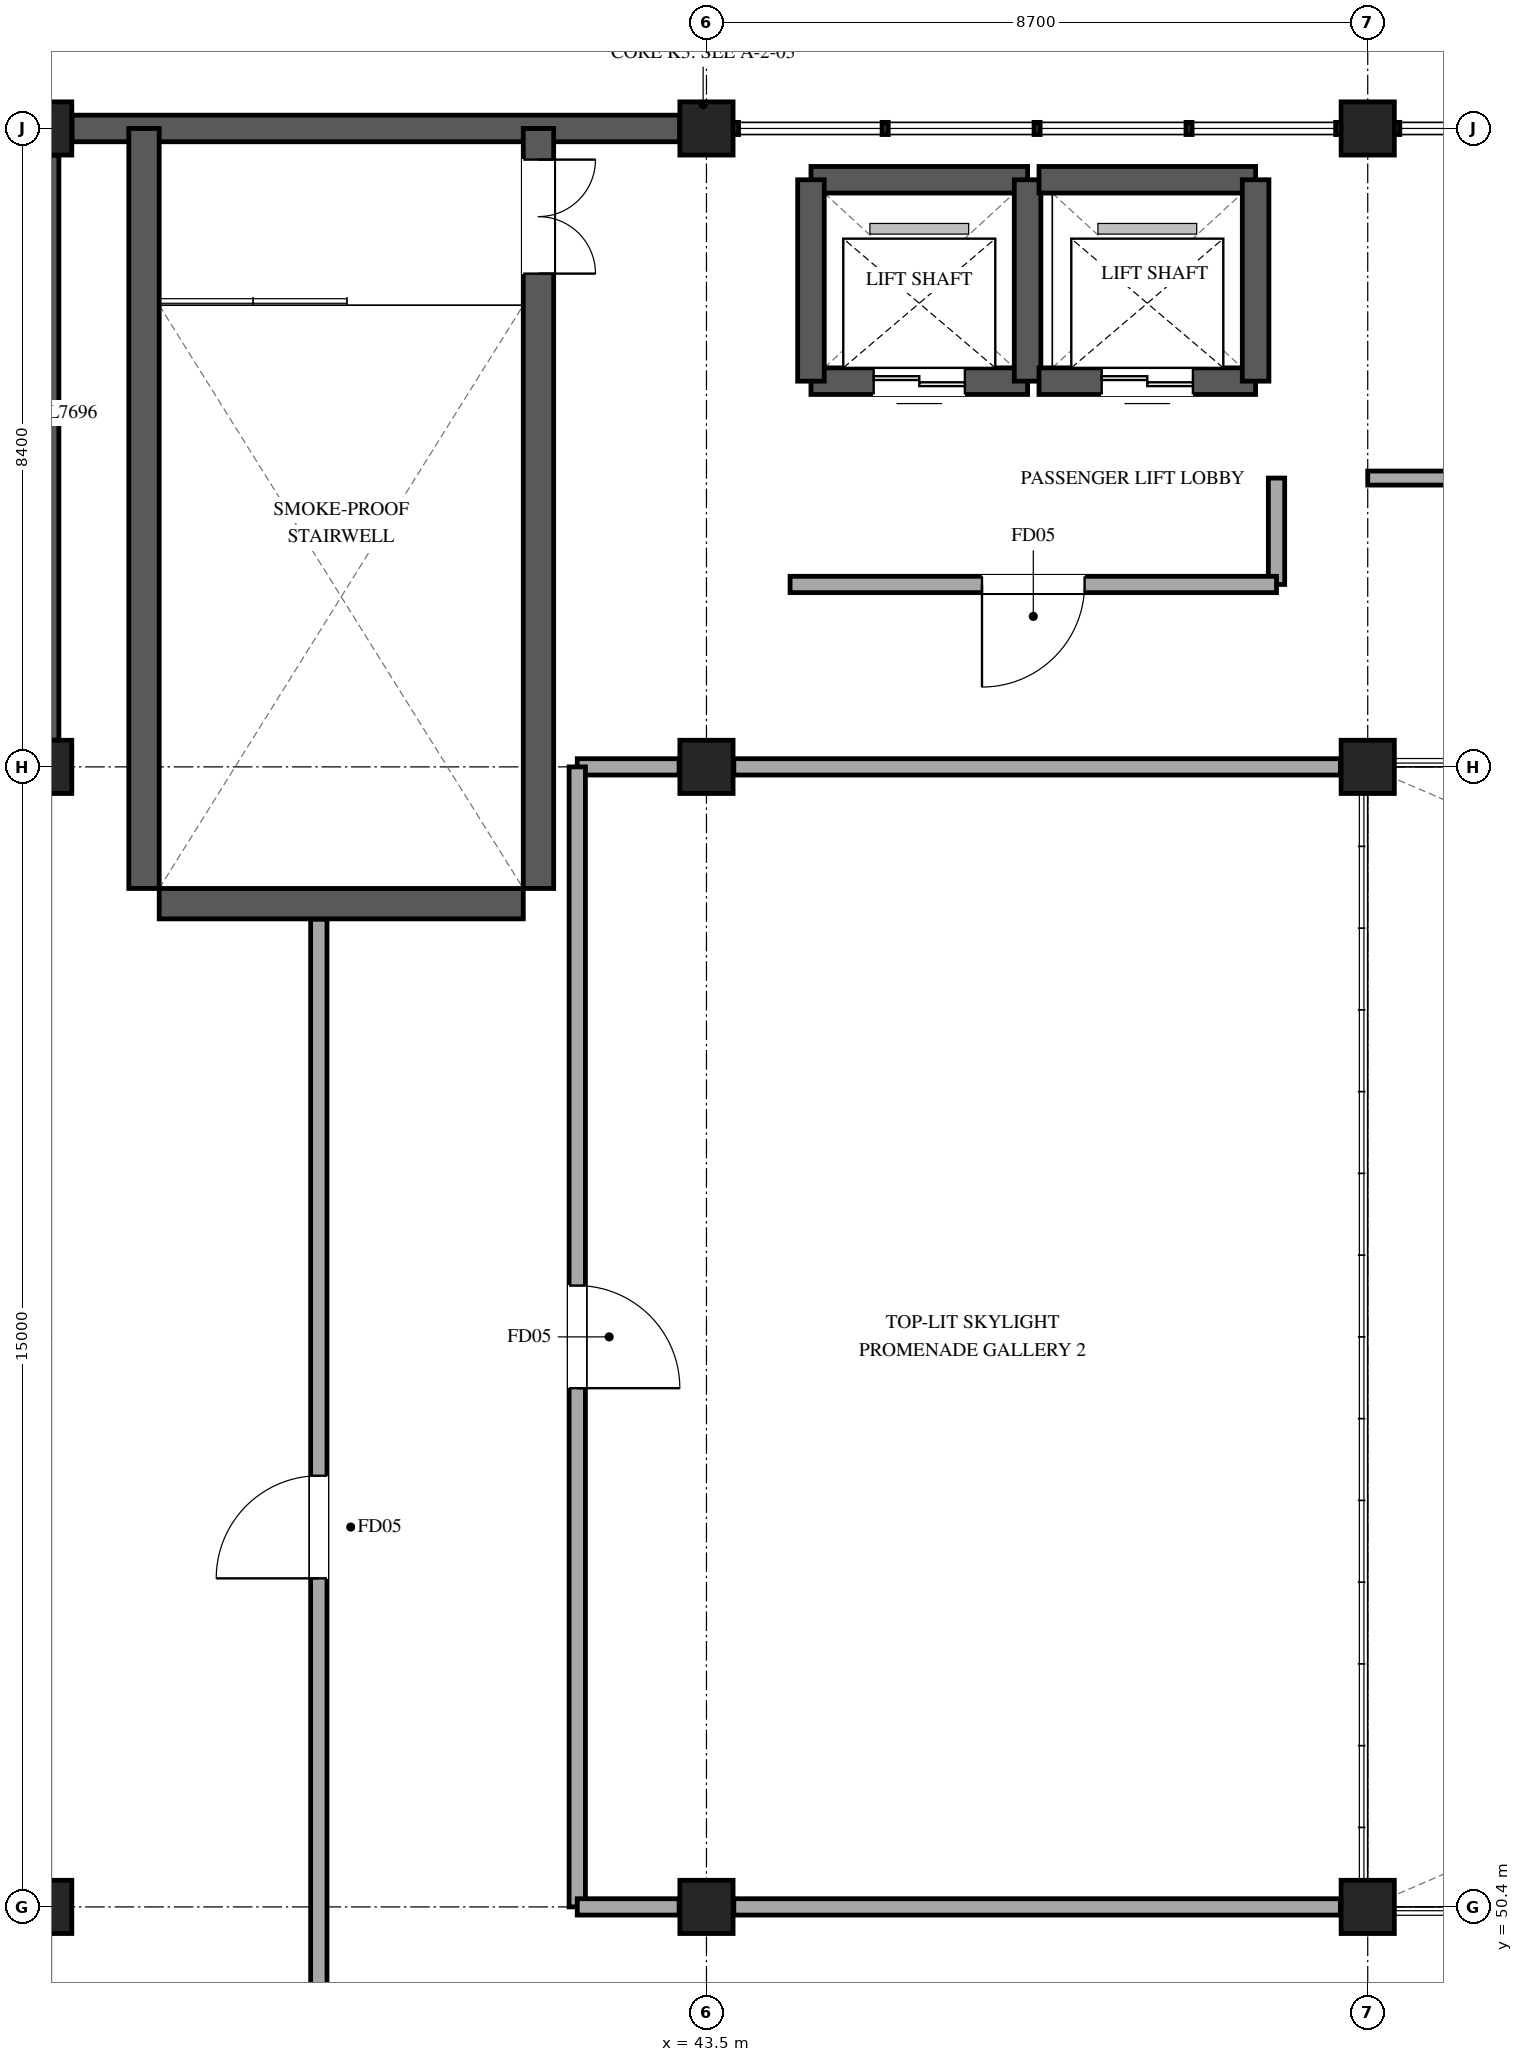
"""IFC4 building model, lengths in metres.
Left out: names, types, materials, properties, quantities, classifications, styles, units other than length and angle.
Written with IfcOpenShell. Run it as: python <this file> out.ifc"""

import sys

from ifc_helpers import new_model, si_unit, direction, frame, frame_2d, origin, origin_2d, place, context, subcontext, project, spatial, rectangle, extrude, element, fill, save


model = new_model("IFC4")
c1 = context("Model", 3, precision=1e-05, world=origin(), true_north=direction((0.0, 1.0)))
c2 = subcontext(c1, "Body", "Model", "MODEL_VIEW")
j1 = project(units=[si_unit("LENGTHUNIT", "METRE"), si_unit("PLANEANGLEUNIT", "RADIAN")], contexts=[c1])
p1 = place(None, origin())
s1 = spatial("IfcSite", under=j1, at=p1, CompositionType="ELEMENT")
p2 = place(p1, origin())
s2 = spatial("IfcBuilding", under=s1, at=p2, CompositionType="ELEMENT")
p3 = place(p2, frame((0.0, 0.0, 31.5)))
s3 = spatial("IfcBuildingStorey", under=s2, at=p3, CompositionType="ELEMENT", Elevation=31.5)
for number, where, z_axis, x_axis in (
    (1, (34.8, 50.4, 0.0), (0.0, 0.0, 1.0), (1.0, 0.0, 0.0)),
    (2, (34.8, 65.4, 0.0), (0.0, 0.0, 1.0), (1.0, 0.0, 0.0)),
    (3, (34.8, 73.8, 0.0), (0.0, 0.0, 1.0), (1.0, 0.0, 0.0)),
    (4, (43.5, 50.4, 0.0), (0.0, 0.0, 1.0), (1.0, 0.0, 0.0)),
    (5, (43.5, 65.4, 0.0), (0.0, 0.0, 1.0), (1.0, 0.0, 0.0)),
    (6, (43.5, 73.8, 0.0), (0.0, 0.0, 1.0), (1.0, 0.0, 0.0)),
    (7, (52.2, 50.4, 0.0), (0.0, 0.0, 1.0), (1.0, 0.0, 0.0)),
    (8, (52.2, 65.4, 0.0), (0.0, 0.0, 1.0), (1.0, 0.0, 0.0)),
    (9, (52.2, 73.8, 0.0), (0.0, 0.0, 1.0), (1.0, 0.0, 0.0)),
):
    element("IfcColumn", number, at=place(p3, frame(where, z_axis=z_axis, x_axis=x_axis)), inside=s3, PredefinedType="COLUMN", context=c2, shape_type="SweptSolid", body=[
        extrude(rectangle(XDim=0.7, YDim=0.7, at=origin_2d()), origin(), (0.0, 0.0, 1.0), 4.8),
    ])
p4 = place(p3, frame((34.8, 65.752, 0.0), z_axis=(0.0, 0.0, 1.0), x_axis=(0.0, 1.0, 0.0)))
e10 = element("IfcWall", 10, at=p4, inside=s3, PredefinedType="STANDARD", context=c2, shape_type="SweptSolid", body=[
    extrude(rectangle(XDim=7.696, YDim=0.36, at=frame_2d((3.848, 0.0))), origin(), (0.0, 0.0, 1.0), 4.49),
])
p5 = place(p3, frame((35.152, 73.8, 0.0), z_axis=(0.0, 0.0, 1.0), x_axis=(1.0, 0.0, 0.0)))
e11 = element("IfcWall", 11, at=p5, inside=s3, PredefinedType="STANDARD", context=c2, shape_type="SweptSolid", body=[
    extrude(rectangle(XDim=7.996, YDim=0.35, at=frame_2d((3.998, 0.0))), origin(), (0.0, 0.0, 1.0), 4.49),
])
p6 = place(p3, frame((36.1, 63.8, 0.0), z_axis=(0.0, 0.0, 1.0), x_axis=(0.0, 1.0, 0.0)))
e12 = element("IfcWall", 12, at=p6, inside=s3, PredefinedType="SHEAR", context=c2, shape_type="SweptSolid", body=[
    extrude(rectangle(XDim=10.0, YDim=0.4, at=frame_2d((5.0, 0.0))), origin(), (0.0, 0.0, 1.0), 4.8),
])
p7 = place(p3, frame((41.29, 73.8, 0.0), z_axis=(0.0, 0.0, 1.0), x_axis=(0.0, -1.0, 0.0)))
e13 = element("IfcWall", 13, at=p7, inside=s3, PredefinedType="SHEAR", context=c2, shape_type="SweptSolid", body=[
    extrude(rectangle(XDim=10.0, YDim=0.4, at=frame_2d((5.0, 0.0))), origin(), (0.0, 0.0, 1.0), 4.8),
])
p8 = place(p7, frame((0.41, 0.0, 0.0)))
e14 = element("IfcOpeningElement", 14, at=p8, cuts=e13, PredefinedType="OPENING", context=c2, shape_type="SweptSolid", body=[
    extrude(rectangle(XDim=1.5, YDim=2.2, at=frame_2d((0.75, 1.1))), frame((0.0, 0.21, 0.0), z_axis=(0.0, -1.0, 0.0), x_axis=(1.0, 0.0, 0.0)), (0.0, 0.0, 1.0), 0.42),
])
p9 = place(p3, frame((41.09, 63.6, 0.0), z_axis=(0.0, 0.0, 1.0), x_axis=(-1.0, 0.0, 0.0)))
e15 = element("IfcWall", 15, at=p9, inside=s3, PredefinedType="SHEAR", context=c2, shape_type="SweptSolid", body=[
    extrude(rectangle(XDim=4.79, YDim=0.4, at=frame_2d((2.395, 0.0))), origin(), (0.0, 0.0, 1.0), 4.8),
])
p10 = place(p3, frame((44.875, 73.125, 0.0), z_axis=(0.0, 0.0, 1.0), x_axis=(1.0, 0.0, 0.0)))
e16 = element("IfcWall", 16, at=p10, inside=s3, PredefinedType="SHEAR", context=c2, shape_type="SweptSolid", body=[
    extrude(rectangle(XDim=2.85, YDim=0.35, at=frame_2d((1.425, 0.0))), origin(), (0.0, 0.0, 1.0), 4.8),
])
p11 = place(p3, frame((47.725, 70.475, 0.0), z_axis=(0.0, 0.0, 1.0), x_axis=(-1.0, 0.0, 0.0)))
e17 = element("IfcWall", 17, at=p11, inside=s3, PredefinedType="SHEAR", context=c2, shape_type="SweptSolid", body=[
    extrude(rectangle(XDim=2.85, YDim=0.35, at=frame_2d((1.425, 0.0))), origin(), (0.0, 0.0, 1.0), 4.8),
])
p12 = place(p11, frame((0.825, 0.0, 0.0)))
e18 = element("IfcOpeningElement", 18, at=p12, cuts=e17, PredefinedType="OPENING", context=c2, shape_type="SweptSolid", body=[
    extrude(rectangle(XDim=1.2, YDim=2.2, at=frame_2d((0.6, 1.1))), frame((0.0, 0.185, 0.0), z_axis=(0.0, -1.0, 0.0), x_axis=(1.0, 0.0, 0.0)), (0.0, 0.0, 1.0), 0.37),
])
for number, where, z_axis, x_axis in (
    (19, (44.875, 70.475, 0.0), (0.0, 0.0, 1.0), (0.0, 1.0, 0.0)),
    (20, (47.725, 73.125, 0.0), (0.0, 0.0, 1.0), (0.0, -1.0, 0.0)),
):
    element("IfcWall", number, at=place(p3, frame(where, z_axis=z_axis, x_axis=x_axis)), inside=s3, PredefinedType="SHEAR", context=c2, shape_type="SweptSolid", body=[
        extrude(rectangle(XDim=2.65, YDim=0.35, at=frame_2d((1.325, 0.0))), origin(), (0.0, 0.0, 1.0), 4.8),
    ])
p13 = place(p3, frame((47.875, 73.125, 0.0), z_axis=(0.0, 0.0, 1.0), x_axis=(1.0, 0.0, 0.0)))
e21 = element("IfcWall", 21, at=p13, inside=s3, PredefinedType="SHEAR", context=c2, shape_type="SweptSolid", body=[
    extrude(rectangle(XDim=2.85, YDim=0.35, at=frame_2d((1.425, 0.0))), origin(), (0.0, 0.0, 1.0), 4.8),
])
p14 = place(p3, frame((50.725, 70.475, 0.0), z_axis=(0.0, 0.0, 1.0), x_axis=(-1.0, 0.0, 0.0)))
e22 = element("IfcWall", 22, at=p14, inside=s3, PredefinedType="SHEAR", context=c2, shape_type="SweptSolid", body=[
    extrude(rectangle(XDim=2.85, YDim=0.35, at=frame_2d((1.425, 0.0))), origin(), (0.0, 0.0, 1.0), 4.8),
])
p15 = place(p14, frame((0.825, 0.0, 0.0)))
e23 = element("IfcOpeningElement", 23, at=p15, cuts=e22, PredefinedType="OPENING", context=c2, shape_type="SweptSolid", body=[
    extrude(rectangle(XDim=1.2, YDim=2.2, at=frame_2d((0.6, 1.1))), frame((0.0, 0.185, 0.0), z_axis=(0.0, -1.0, 0.0), x_axis=(1.0, 0.0, 0.0)), (0.0, 0.0, 1.0), 0.37),
])
p16 = place(p3, frame((50.725, 73.125, 0.0), z_axis=(0.0, 0.0, 1.0), x_axis=(0.0, -1.0, 0.0)))
e24 = element("IfcWall", 24, at=p16, inside=s3, PredefinedType="SHEAR", context=c2, shape_type="SweptSolid", body=[
    extrude(rectangle(XDim=2.65, YDim=0.35, at=frame_2d((1.325, 0.0))), origin(), (0.0, 0.0, 1.0), 4.8),
])
p17 = place(p3, frame((51.0, 69.2, 0.0), z_axis=(0.0, 0.0, 1.0), x_axis=(0.0, -1.0, 0.0)))
e25 = element("IfcWall", 25, at=p17, inside=s3, PredefinedType="PARTITIONING", context=c2, shape_type="SweptSolid", body=[
    extrude(rectangle(XDim=1.4, YDim=0.215, at=frame_2d((0.7, 0.0))), origin(), (0.0, 0.0, 1.0), 4.46),
])
p18 = place(p3, frame((51.0, 67.8, 0.0), z_axis=(0.0, 0.0, 1.0), x_axis=(-1.0, 0.0, 0.0)))
e26 = element("IfcWall", 26, at=p18, inside=s3, PredefinedType="PARTITIONING", context=c2, shape_type="SweptSolid", body=[
    extrude(rectangle(XDim=6.4, YDim=0.215, at=frame_2d((3.2, 0.0))), origin(), (0.0, 0.0, 1.0), 4.46),
])
p19 = place(p18, frame((2.525, 0.0, 0.0)))
e27 = element("IfcOpeningElement", 27, at=p19, cuts=e26, PredefinedType="OPENING", context=c2, shape_type="SweptSolid", body=[
    extrude(rectangle(XDim=1.35, YDim=2.2, at=frame_2d((0.675, 1.1))), frame((0.0, 0.118, 0.0), z_axis=(0.0, -1.0, 0.0), x_axis=(1.0, 0.0, 0.0)), (0.0, 0.0, 1.0), 0.235),
])
p20 = place(p3, frame((38.4, 47.4, 0.0), z_axis=(0.0, 0.0, 1.0), x_axis=(0.0, 1.0, 0.0)))
e28 = element("IfcWall", 28, at=p20, inside=s3, PredefinedType="PARTITIONING", context=c2, shape_type="SweptSolid", body=[
    extrude(rectangle(XDim=15.995, YDim=0.215, at=frame_2d((7.998, 0.0))), origin(), (0.0, 0.0, 1.0), 3.56),
])
p21 = place(p20, frame((7.323, 0.0, 0.0)))
e29 = element("IfcOpeningElement", 29, at=p21, cuts=e28, PredefinedType="OPENING", context=c2, shape_type="SweptSolid", body=[
    extrude(rectangle(XDim=1.35, YDim=2.2, at=frame_2d((0.675, 1.1))), frame((0.0, 0.118, 0.0), z_axis=(0.0, -1.0, 0.0), x_axis=(1.0, 0.0, 0.0)), (0.0, 0.0, 1.0), 0.235),
])
p22 = place(p3, frame((51.84, 65.4, 0.0), z_axis=(0.0, 0.0, 1.0), x_axis=(-1.0, 0.0, 0.0)))
e30 = element("IfcWall", 30, at=p22, inside=s3, PredefinedType="PARTITIONING", context=c2, shape_type="SweptSolid", body=[
    extrude(rectangle(XDim=7.98, YDim=0.215, at=frame_2d((3.99, 0.0))), origin(), (0.0, 0.0, 1.0), 3.56),
])
p23 = place(p3, frame((43.14, 65.4, 0.0), z_axis=(0.0, 0.0, 1.0), x_axis=(-1.0, 0.0, 0.0)))
e31 = element("IfcWall", 31, at=p23, inside=s3, PredefinedType="PARTITIONING", context=c2, shape_type="SweptSolid", body=[
    extrude(rectangle(XDim=1.34, YDim=0.215, at=frame_2d((0.67, 0.0))), origin(), (0.0, 0.0, 1.0), 4.46),
])
p24 = place(p3, frame((41.8, 65.4, 0.0), z_axis=(0.0, 0.0, 1.0), x_axis=(0.0, -1.0, 0.0)))
e32 = element("IfcWall", 32, at=p24, inside=s3, PredefinedType="PARTITIONING", context=c2, shape_type="SweptSolid", body=[
    extrude(rectangle(XDim=15.0, YDim=0.215, at=frame_2d((7.5, 0.0))), origin(), (0.0, 0.0, 1.0), 3.56),
])
p25 = place(p24, frame((6.825, 0.0, 0.0)))
e33 = element("IfcOpeningElement", 33, at=p25, cuts=e32, PredefinedType="OPENING", context=c2, shape_type="SweptSolid", body=[
    extrude(rectangle(XDim=1.35, YDim=2.2, at=frame_2d((0.675, 1.1))), frame((0.0, 0.118, 0.0), z_axis=(0.0, -1.0, 0.0), x_axis=(1.0, 0.0, 0.0)), (0.0, 0.0, 1.0), 0.235),
])
p26 = place(p3, frame((41.8, 50.4, 0.0), z_axis=(0.0, 0.0, 1.0), x_axis=(1.0, 0.0, 0.0)))
e34 = element("IfcWall", 34, at=p26, inside=s3, PredefinedType="PARTITIONING", context=c2, shape_type="SweptSolid", body=[
    extrude(rectangle(XDim=1.34, YDim=0.215, at=frame_2d((0.67, 0.0))), origin(), (0.0, 0.0, 1.0), 3.56),
])
p27 = place(p3, frame((43.86, 50.4, 0.0), z_axis=(0.0, 0.0, 1.0), x_axis=(1.0, 0.0, 0.0)))
e35 = element("IfcWall", 35, at=p27, inside=s3, PredefinedType="PARTITIONING", context=c2, shape_type="SweptSolid", body=[
    extrude(rectangle(XDim=7.98, YDim=0.215, at=frame_2d((3.99, 0.0))), origin(), (0.0, 0.0, 1.0), 3.56),
])
p28 = place(p3, frame((52.2, 69.2, 0.0), z_axis=(0.0, 0.0, 1.0), x_axis=(1.0, 0.0, 0.0)))
e36 = element("IfcWall", 36, at=p28, inside=s3, PredefinedType="PARTITIONING", context=c2, shape_type="SweptSolid", body=[
    extrude(rectangle(XDim=27.8, YDim=0.185, at=frame_2d((13.9, 0.0))), origin(), (0.0, 0.0, 1.0), 3.76),
])
p29 = place(p28, frame((13.225, 0.0, 0.0)))
e37 = element("IfcOpeningElement", 37, at=p29, cuts=e36, PredefinedType="OPENING", context=c2, shape_type="SweptSolid", body=[
    extrude(rectangle(XDim=1.35, YDim=2.2, at=frame_2d((0.675, 1.1))), frame((0.0, 0.103, 0.0), z_axis=(0.0, -1.0, 0.0), x_axis=(1.0, 0.0, 0.0)), (0.0, 0.0, 1.0), 0.205),
])
p30 = place(p8, origin())
e38 = element("IfcDoor", 38, at=p30, inside=s3, OperationType="DOUBLE_DOOR_SINGLE_SWING", PredefinedType="DOOR", context=c2, shape_type="SweptSolid", body=[
    extrude(rectangle(XDim=1.5, YDim=2.2, at=frame_2d((0.75, 1.1))), frame((0.0, 0.025, 0.0), z_axis=(0.0, -1.0, 0.0), x_axis=(1.0, 0.0, 0.0)), (0.0, 0.0, 1.0), 0.05),
])
fill(e14, e38)
p31 = place(p12, origin())
e39 = element("IfcDoor", 39, at=p31, inside=s3, OperationType="DOUBLE_DOOR_SLIDING", PredefinedType="DOOR", context=c2, shape_type="SweptSolid", body=[
    extrude(rectangle(XDim=1.2, YDim=2.2, at=frame_2d((0.6, 1.1))), frame((0.0, 0.025, 0.0), z_axis=(0.0, -1.0, 0.0), x_axis=(1.0, 0.0, 0.0)), (0.0, 0.0, 1.0), 0.05),
])
fill(e18, e39)
p32 = place(p15, origin())
e40 = element("IfcDoor", 40, at=p32, inside=s3, OperationType="DOUBLE_DOOR_SLIDING", PredefinedType="DOOR", context=c2, shape_type="SweptSolid", body=[
    extrude(rectangle(XDim=1.2, YDim=2.2, at=frame_2d((0.6, 1.1))), frame((0.0, 0.025, 0.0), z_axis=(0.0, -1.0, 0.0), x_axis=(1.0, 0.0, 0.0)), (0.0, 0.0, 1.0), 0.05),
])
fill(e23, e40)
p33 = place(p19, origin())
e41 = element("IfcDoor", 41, at=p33, inside=s3, OperationType="SINGLE_SWING_RIGHT", PredefinedType="DOOR", context=c2, shape_type="SweptSolid", body=[
    extrude(rectangle(XDim=1.35, YDim=2.2, at=frame_2d((0.675, 1.1))), frame((0.0, 0.025, 0.0), z_axis=(0.0, -1.0, 0.0), x_axis=(1.0, 0.0, 0.0)), (0.0, 0.0, 1.0), 0.05),
])
fill(e27, e41)
p34 = place(p21, origin())
e42 = element("IfcDoor", 42, at=p34, inside=s3, OperationType="SINGLE_SWING_LEFT", PredefinedType="DOOR", context=c2, shape_type="SweptSolid", body=[
    extrude(rectangle(XDim=1.35, YDim=2.2, at=frame_2d((0.675, 1.1))), frame((0.0, 0.025, 0.0), z_axis=(0.0, -1.0, 0.0), x_axis=(1.0, 0.0, 0.0)), (0.0, 0.0, 1.0), 0.05),
])
fill(e29, e42)
p35 = place(p25, origin())
e43 = element("IfcDoor", 43, at=p35, inside=s3, OperationType="SINGLE_SWING_RIGHT", PredefinedType="DOOR", context=c2, shape_type="SweptSolid", body=[
    extrude(rectangle(XDim=1.35, YDim=2.2, at=frame_2d((0.675, 1.1))), frame((0.0, 0.025, 0.0), z_axis=(0.0, -1.0, 0.0), x_axis=(1.0, 0.0, 0.0)), (0.0, 0.0, 1.0), 0.05),
])
fill(e33, e43)
save(model, sys.argv[1])
